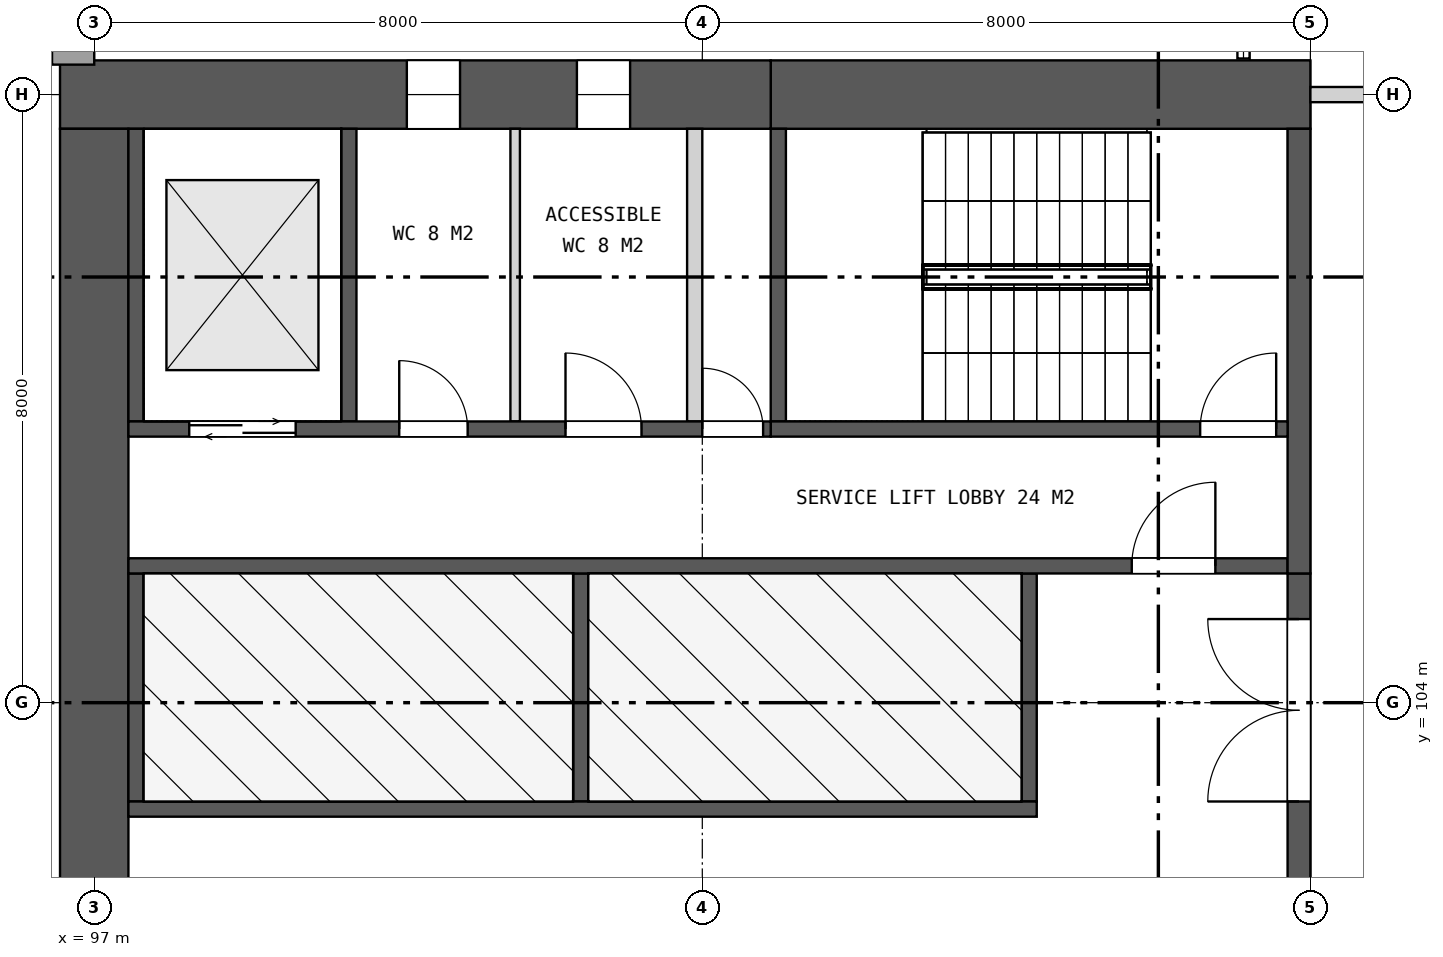
"""IFC4 building model, lengths in metres.
Left out: names, types, materials, properties, quantities, classifications, styles, units other than length and angle.
Written with IfcOpenShell. Run it as: python <this file> out.ifc"""

import sys

from ifc_helpers import new_model, si_unit, direction, frame, frame_2d, origin, place, context, subcontext, project, spatial, rectangle, extrude, element, fill, save


model = new_model("IFC4")
c1 = context("Model", 3, precision=1e-05, world=origin(), true_north=direction((0.0, 1.0)))
c2 = subcontext(c1, "Body", "Model", "MODEL_VIEW")
j1 = project(units=[si_unit("LENGTHUNIT", "METRE"), si_unit("PLANEANGLEUNIT", "RADIAN")], contexts=[c1])
p1 = place(None, origin())
s1 = spatial("IfcSite", under=j1, at=p1, CompositionType="ELEMENT")
p2 = place(p1, origin())
s2 = spatial("IfcBuilding", under=s1, at=p2, CompositionType="ELEMENT")
p3 = place(p2, frame((0.0, 0.0, 17.5)))
s3 = spatial("IfcBuildingStorey", under=s2, at=p3, CompositionType="ELEMENT", Elevation=17.5)
p4 = place(p3, frame((113.0, 112.0, 0.0), z_axis=(0.0, 0.0, 1.0), x_axis=(-1.0, 0.0, 0.0)))
e1 = element("IfcWall", 1, at=p4, inside=s3, PredefinedType="SHEAR", context=c2, shape_type="SweptSolid", body=[
    extrude(rectangle(XDim=7.1, YDim=0.9, at=frame_2d((3.55, 0.0))), origin(), (0.0, 0.0, 1.0), 7.5),
])
p5 = place(p3, frame((105.9, 112.0, 0.0), z_axis=(0.0, 0.0, 1.0), x_axis=(-1.0, 0.0, 0.0)))
e2 = element("IfcWall", 2, at=p5, inside=s3, PredefinedType="SHEAR", context=c2, shape_type="SweptSolid", body=[
    extrude(rectangle(XDim=9.35, YDim=0.9, at=frame_2d((4.675, 0.0))), origin(), (0.0, 0.0, 1.0), 7.5),
])
p6 = place(p5, frame((1.85, 0.0, 1.5)))
e3 = element("IfcOpeningElement", 3, at=p6, cuts=e2, PredefinedType="OPENING", context=c2, shape_type="SweptSolid", body=[
    extrude(rectangle(XDim=0.7, YDim=0.9, at=frame_2d((0.35, 0.45))), frame((0.0, 0.46, 0.0), z_axis=(0.0, -1.0, 0.0), x_axis=(1.0, 0.0, 0.0)), (0.0, 0.0, 1.0), 0.92),
])
p7 = place(p5, frame((4.087, 0.0, 1.5)))
e4 = element("IfcOpeningElement", 4, at=p7, cuts=e2, PredefinedType="OPENING", context=c2, shape_type="SweptSolid", body=[
    extrude(rectangle(XDim=0.7, YDim=0.9, at=frame_2d((0.35, 0.45))), frame((0.0, 0.46, 0.0), z_axis=(0.0, -1.0, 0.0), x_axis=(1.0, 0.0, 0.0)), (0.0, 0.0, 1.0), 0.92),
])
p8 = place(p3, frame((97.0, 111.55, 0.0), z_axis=(0.0, 0.0, 1.0), x_axis=(0.0, -1.0, 0.0)))
e5 = element("IfcWall", 5, at=p8, inside=s3, PredefinedType="SHEAR", context=c2, shape_type="SweptSolid", body=[
    extrude(rectangle(XDim=23.1, YDim=0.9, at=frame_2d((11.55, 0.0))), origin(), (0.0, 0.0, 1.0), 7.5),
])
p9 = place(p8, frame((10.35, 0.0, 0.0)))
e6 = element("IfcOpeningElement", 6, at=p9, cuts=e5, PredefinedType="OPENING", context=c2, shape_type="SweptSolid", body=[
    extrude(rectangle(XDim=2.4, YDim=2.4, at=frame_2d((1.2, 1.2))), frame((0.0, 0.46, 0.0), z_axis=(0.0, -1.0, 0.0), x_axis=(1.0, 0.0, 0.0)), (0.0, 0.0, 1.0), 0.92),
])
p10 = place(p3, frame((112.85, 105.7, 0.0), z_axis=(0.0, 0.0, 1.0), x_axis=(0.0, -1.0, 0.0)))
e7 = element("IfcWall", 7, at=p10, inside=s3, PredefinedType="SHEAR", context=c2, shape_type="SweptSolid", body=[
    extrude(rectangle(XDim=11.4, YDim=0.3, at=frame_2d((5.7, 0.0))), origin(), (0.0, 0.0, 1.0), 7.5),
])
p11 = place(p10, frame((0.6, 0.0, 0.0)))
e8 = element("IfcOpeningElement", 8, at=p11, cuts=e7, PredefinedType="OPENING", context=c2, shape_type="SweptSolid", body=[
    extrude(rectangle(XDim=2.4, YDim=2.4, at=frame_2d((1.2, 1.2))), frame((0.0, 0.16, 0.0), z_axis=(0.0, -1.0, 0.0), x_axis=(1.0, 0.0, 0.0)), (0.0, 0.0, 1.0), 0.32),
])
p12 = place(p10, frame((4.5, 0.0, 0.0)))
e9 = element("IfcOpeningElement", 9, at=p12, cuts=e7, PredefinedType="OPENING", context=c2, shape_type="SweptSolid", body=[
    extrude(rectangle(XDim=2.4, YDim=2.4, at=frame_2d((1.2, 1.2))), frame((0.0, 0.16, 0.0), z_axis=(0.0, -1.0, 0.0), x_axis=(1.0, 0.0, 0.0)), (0.0, 0.0, 1.0), 0.32),
])
p13 = place(p10, frame((8.4, 0.0, 0.0)))
e10 = element("IfcOpeningElement", 10, at=p13, cuts=e7, PredefinedType="OPENING", context=c2, shape_type="SweptSolid", body=[
    extrude(rectangle(XDim=2.4, YDim=2.4, at=frame_2d((1.2, 1.2))), frame((0.0, 0.16, 0.0), z_axis=(0.0, -1.0, 0.0), x_axis=(1.0, 0.0, 0.0)), (0.0, 0.0, 1.0), 0.32),
])
for number, where, z_axis, x_axis in (
    (11, (109.3, 105.7, 0.0), (0.0, 0.0, 1.0), (0.0, -1.0, 0.0)),
    (12, (103.4, 105.7, 0.0), (0.0, 0.0, 1.0), (0.0, -1.0, 0.0)),
    (13, (97.55, 105.7, 0.0), (0.0, 0.0, 1.0), (0.0, -1.0, 0.0)),
):
    element("IfcWall", number, at=place(p3, frame(where, z_axis=z_axis, x_axis=x_axis)), inside=s3, PredefinedType="SHEAR", context=c2, shape_type="SweptSolid", body=[
        extrude(rectangle(XDim=3.0, YDim=0.2, at=frame_2d((1.5, 0.0))), origin(), (0.0, 0.0, 1.0), 7.5),
    ])
p14 = place(p3, frame((109.4, 102.6, 0.0), z_axis=(0.0, 0.0, 1.0), x_axis=(-1.0, 0.0, 0.0)))
e14 = element("IfcWall", 14, at=p14, inside=s3, PredefinedType="SHEAR", context=c2, shape_type="SweptSolid", body=[
    extrude(rectangle(XDim=11.95, YDim=0.2, at=frame_2d((5.975, 0.0))), origin(), (0.0, 0.0, 1.0), 7.5),
])
p15 = place(p3, frame((112.7, 105.8, 0.0), z_axis=(0.0, 0.0, 1.0), x_axis=(-1.0, 0.0, 0.0)))
e15 = element("IfcWall", 15, at=p15, inside=s3, PredefinedType="SHEAR", context=c2, shape_type="SweptSolid", body=[
    extrude(rectangle(XDim=15.25, YDim=0.2, at=frame_2d((7.625, 0.0))), origin(), (0.0, 0.0, 1.0), 7.5),
])
p16 = place(p15, frame((0.95, 0.0, 0.0)))
e16 = element("IfcOpeningElement", 16, at=p16, cuts=e15, PredefinedType="OPENING", context=c2, shape_type="SweptSolid", body=[
    extrude(rectangle(XDim=1.1, YDim=2.1, at=frame_2d((0.55, 1.05))), frame((0.0, 0.11, 0.0), z_axis=(0.0, -1.0, 0.0), x_axis=(1.0, 0.0, 0.0)), (0.0, 0.0, 1.0), 0.22),
])
p17 = place(p3, frame((112.85, 111.55, 0.0), z_axis=(0.0, 0.0, 1.0), x_axis=(0.0, -1.0, 0.0)))
e17 = element("IfcWall", 17, at=p17, inside=s3, PredefinedType="SHEAR", context=c2, shape_type="SweptSolid", body=[
    extrude(rectangle(XDim=5.85, YDim=0.3, at=frame_2d((2.925, 0.0))), origin(), (0.0, 0.0, 1.0), 7.5),
])
for number, where, z_axis, x_axis in (
    (18, (106.0, 111.55, 0.0), (0.0, 0.0, 1.0), (0.0, -1.0, 0.0)),
    (19, (100.35, 111.55, 0.0), (0.0, 0.0, 1.0), (0.0, -1.0, 0.0)),
    (20, (97.55, 111.55, 0.0), (0.0, 0.0, 1.0), (0.0, -1.0, 0.0)),
):
    element("IfcWall", number, at=place(p3, frame(where, z_axis=z_axis, x_axis=x_axis)), inside=s3, PredefinedType="SHEAR", context=c2, shape_type="SweptSolid", body=[
        extrude(rectangle(XDim=3.85, YDim=0.2, at=frame_2d((1.925, 0.0))), origin(), (0.0, 0.0, 1.0), 7.5),
    ])
p18 = place(p3, frame((104.9, 111.55, 0.0), z_axis=(0.0, 0.0, 1.0), x_axis=(0.0, -1.0, 0.0)))
e21 = element("IfcWall", 21, at=p18, inside=s3, PredefinedType="PARTITIONING", context=c2, shape_type="SweptSolid", body=[
    extrude(rectangle(XDim=3.85, YDim=0.2, at=frame_2d((1.925, 0.0))), origin(), (0.0, 0.0, 1.0), 7.5),
])
p19 = place(p3, frame((102.538, 111.55, 0.0), z_axis=(0.0, 0.0, 1.0), x_axis=(0.0, -1.0, 0.0)))
e22 = element("IfcWall", 22, at=p19, inside=s3, PredefinedType="PARTITIONING", context=c2, shape_type="SweptSolid", body=[
    extrude(rectangle(XDim=3.85, YDim=0.125, at=frame_2d((1.925, 0.0))), origin(), (0.0, 0.0, 1.0), 7.5),
])
p20 = place(p3, frame((112.7, 107.6, 0.0), z_axis=(0.0, 0.0, 1.0), x_axis=(-1.0, 0.0, 0.0)))
e23 = element("IfcWall", 23, at=p20, inside=s3, PredefinedType="SHEAR", context=c2, shape_type="SweptSolid", body=[
    extrude(rectangle(XDim=6.8, YDim=0.2, at=frame_2d((3.4, 0.0))), origin(), (0.0, 0.0, 1.0), 7.5),
])
p21 = place(p20, frame((0.15, 0.0, 0.0)))
e24 = element("IfcOpeningElement", 24, at=p21, cuts=e23, PredefinedType="OPENING", context=c2, shape_type="SweptSolid", body=[
    extrude(rectangle(XDim=1.0, YDim=2.1, at=frame_2d((0.5, 1.05))), frame((0.0, 0.11, 0.0), z_axis=(0.0, -1.0, 0.0), x_axis=(1.0, 0.0, 0.0)), (0.0, 0.0, 1.0), 0.22),
])
p22 = place(p3, frame((105.9, 107.6, 0.0), z_axis=(0.0, 0.0, 1.0), x_axis=(-1.0, 0.0, 0.0)))
e25 = element("IfcWall", 25, at=p22, inside=s3, PredefinedType="SHEAR", context=c2, shape_type="SweptSolid", body=[
    extrude(rectangle(XDim=8.45, YDim=0.2, at=frame_2d((4.225, 0.0))), origin(), (0.0, 0.0, 1.0), 7.5),
])
p23 = place(p22, frame((0.1, 0.0, 0.0)))
e26 = element("IfcOpeningElement", 26, at=p23, cuts=e25, PredefinedType="OPENING", context=c2, shape_type="SweptSolid", body=[
    extrude(rectangle(XDim=0.8, YDim=2.1, at=frame_2d((0.4, 1.05))), frame((0.0, 0.11, 0.0), z_axis=(0.0, -1.0, 0.0), x_axis=(1.0, 0.0, 0.0)), (0.0, 0.0, 1.0), 0.22),
])
p24 = place(p22, frame((1.7, 0.0, 0.0)))
e27 = element("IfcOpeningElement", 27, at=p24, cuts=e25, PredefinedType="OPENING", context=c2, shape_type="SweptSolid", body=[
    extrude(rectangle(XDim=1.0, YDim=2.1, at=frame_2d((0.5, 1.05))), frame((0.0, 0.11, 0.0), z_axis=(0.0, -1.0, 0.0), x_axis=(1.0, 0.0, 0.0)), (0.0, 0.0, 1.0), 0.22),
])
p25 = place(p22, frame((3.987, 0.0, 0.0)))
e28 = element("IfcOpeningElement", 28, at=p25, cuts=e25, PredefinedType="OPENING", context=c2, shape_type="SweptSolid", body=[
    extrude(rectangle(XDim=0.9, YDim=2.1, at=frame_2d((0.45, 1.05))), frame((0.0, 0.11, 0.0), z_axis=(0.0, -1.0, 0.0), x_axis=(1.0, 0.0, 0.0)), (0.0, 0.0, 1.0), 0.22),
])
p26 = place(p22, frame((6.25, 0.0, 0.0)))
e29 = element("IfcOpeningElement", 29, at=p26, cuts=e25, PredefinedType="OPENING", context=c2, shape_type="SweptSolid", body=[
    extrude(rectangle(XDim=1.4, YDim=2.1, at=frame_2d((0.7, 1.05))), frame((0.0, 0.11, 0.0), z_axis=(0.0, -1.0, 0.0), x_axis=(1.0, 0.0, 0.0)), (0.0, 0.0, 1.0), 0.22),
])
p27 = place(p3, frame((96.445, 112.597, 0.0), z_axis=(0.0, 0.0, 1.0), x_axis=(1.0, 0.0, 0.0)))
e30 = element("IfcWall", 30, at=p27, inside=s3, PredefinedType="SOLIDWALL", context=c2, shape_type="SweptSolid", body=[
    extrude(rectangle(XDim=0.555, YDim=0.406, at=frame_2d((0.277, 0.0))), origin(), (0.0, 0.0, 1.0), 7.1),
])
p28 = place(p3, frame((113.0, 112.0, 0.0), z_axis=(0.0, 0.0, 1.0), x_axis=(1.0, 0.0, 0.0)))
e31 = element("IfcWall", 31, at=p28, inside=s3, PredefinedType="PARTITIONING", context=c2, shape_type="SweptSolid", body=[
    extrude(rectangle(XDim=7.4, YDim=0.2, at=frame_2d((3.7, 0.0))), origin(), (0.0, 0.0, 1.0), 6.551),
])
p29 = place(p28, frame((2.8, 0.0, 0.0)))
e32 = element("IfcOpeningElement", 32, at=p29, cuts=e31, PredefinedType="OPENING", context=c2, shape_type="SweptSolid", body=[
    extrude(rectangle(XDim=2.4, YDim=2.4, at=frame_2d((1.2, 1.2))), frame((0.0, 0.11, 0.0), z_axis=(0.0, -1.0, 0.0), x_axis=(1.0, 0.0, 0.0)), (0.0, 0.0, 1.0), 0.22),
])
p30 = place(p6, origin())
e33 = element("IfcWindow", 33, at=p30, inside=s3, PartitioningType="SINGLE_PANEL", PredefinedType="WINDOW", context=c2, shape_type="SweptSolid", body=[
    extrude(rectangle(XDim=0.7, YDim=0.9, at=frame_2d((0.35, 0.45))), frame((0.0, 0.03, 0.0), z_axis=(0.0, -1.0, 0.0), x_axis=(1.0, 0.0, 0.0)), (0.0, 0.0, 1.0), 0.06),
])
fill(e3, e33)
p31 = place(p7, origin())
e34 = element("IfcWindow", 34, at=p31, inside=s3, PartitioningType="SINGLE_PANEL", PredefinedType="WINDOW", context=c2, shape_type="SweptSolid", body=[
    extrude(rectangle(XDim=0.7, YDim=0.9, at=frame_2d((0.35, 0.45))), frame((0.0, 0.03, 0.0), z_axis=(0.0, -1.0, 0.0), x_axis=(1.0, 0.0, 0.0)), (0.0, 0.0, 1.0), 0.06),
])
fill(e4, e34)
p32 = place(p11, frame((2.4, 0.0, 0.0), z_axis=(0.0, 0.0, 1.0), x_axis=(-1.0, 0.0, 0.0)))
e35 = element("IfcDoor", 35, at=p32, inside=s3, OperationType="DOUBLE_DOOR_SINGLE_SWING", PredefinedType="DOOR", context=c2, shape_type="SweptSolid", body=[
    extrude(rectangle(XDim=2.4, YDim=2.4, at=frame_2d((1.2, 1.2))), frame((0.0, 0.025, 0.0), z_axis=(0.0, -1.0, 0.0), x_axis=(1.0, 0.0, 0.0)), (0.0, 0.0, 1.0), 0.05),
])
fill(e8, e35)
p33 = place(p16, frame((1.1, 0.0, 0.0), z_axis=(0.0, 0.0, 1.0), x_axis=(-1.0, 0.0, 0.0)))
e36 = element("IfcDoor", 36, at=p33, inside=s3, OperationType="SINGLE_SWING_RIGHT", PredefinedType="DOOR", context=c2, shape_type="SweptSolid", body=[
    extrude(rectangle(XDim=1.1, YDim=2.1, at=frame_2d((0.55, 1.05))), frame((0.0, 0.025, 0.0), z_axis=(0.0, -1.0, 0.0), x_axis=(1.0, 0.0, 0.0)), (0.0, 0.0, 1.0), 0.05),
])
fill(e16, e36)
p34 = place(p21, frame((1.0, 0.0, 0.0), z_axis=(0.0, 0.0, 1.0), x_axis=(-1.0, 0.0, 0.0)))
e37 = element("IfcDoor", 37, at=p34, inside=s3, OperationType="SINGLE_SWING_RIGHT", PredefinedType="DOOR", context=c2, shape_type="SweptSolid", body=[
    extrude(rectangle(XDim=1.0, YDim=2.1, at=frame_2d((0.5, 1.05))), frame((0.0, 0.025, 0.0), z_axis=(0.0, -1.0, 0.0), x_axis=(1.0, 0.0, 0.0)), (0.0, 0.0, 1.0), 0.05),
])
fill(e24, e37)
p35 = place(p23, frame((0.8, 0.0, 0.0), z_axis=(0.0, 0.0, 1.0), x_axis=(-1.0, 0.0, 0.0)))
e38 = element("IfcDoor", 38, at=p35, inside=s3, OperationType="SINGLE_SWING_LEFT", PredefinedType="DOOR", context=c2, shape_type="SweptSolid", body=[
    extrude(rectangle(XDim=0.8, YDim=2.1, at=frame_2d((0.4, 1.05))), frame((0.0, 0.025, 0.0), z_axis=(0.0, -1.0, 0.0), x_axis=(1.0, 0.0, 0.0)), (0.0, 0.0, 1.0), 0.05),
])
fill(e26, e38)
p36 = place(p24, frame((1.0, 0.0, 0.0), z_axis=(0.0, 0.0, 1.0), x_axis=(-1.0, 0.0, 0.0)))
e39 = element("IfcDoor", 39, at=p36, inside=s3, OperationType="SINGLE_SWING_LEFT", PredefinedType="DOOR", context=c2, shape_type="SweptSolid", body=[
    extrude(rectangle(XDim=1.0, YDim=2.1, at=frame_2d((0.5, 1.05))), frame((0.0, 0.025, 0.0), z_axis=(0.0, -1.0, 0.0), x_axis=(1.0, 0.0, 0.0)), (0.0, 0.0, 1.0), 0.05),
])
fill(e27, e39)
p37 = place(p25, frame((0.9, 0.0, 0.0), z_axis=(0.0, 0.0, 1.0), x_axis=(-1.0, 0.0, 0.0)))
e40 = element("IfcDoor", 40, at=p37, inside=s3, OperationType="SINGLE_SWING_LEFT", PredefinedType="DOOR", context=c2, shape_type="SweptSolid", body=[
    extrude(rectangle(XDim=0.9, YDim=2.1, at=frame_2d((0.45, 1.05))), frame((0.0, 0.025, 0.0), z_axis=(0.0, -1.0, 0.0), x_axis=(1.0, 0.0, 0.0)), (0.0, 0.0, 1.0), 0.05),
])
fill(e28, e40)
p38 = place(p26, origin())
e41 = element("IfcDoor", 41, at=p38, inside=s3, OperationType="DOUBLE_DOOR_SLIDING", PredefinedType="DOOR", context=c2, shape_type="SweptSolid", body=[
    extrude(rectangle(XDim=1.4, YDim=2.1, at=frame_2d((0.7, 1.05))), frame((0.0, 0.025, 0.0), z_axis=(0.0, -1.0, 0.0), x_axis=(1.0, 0.0, 0.0)), (0.0, 0.0, 1.0), 0.05),
])
fill(e29, e41)
save(model, sys.argv[1])
